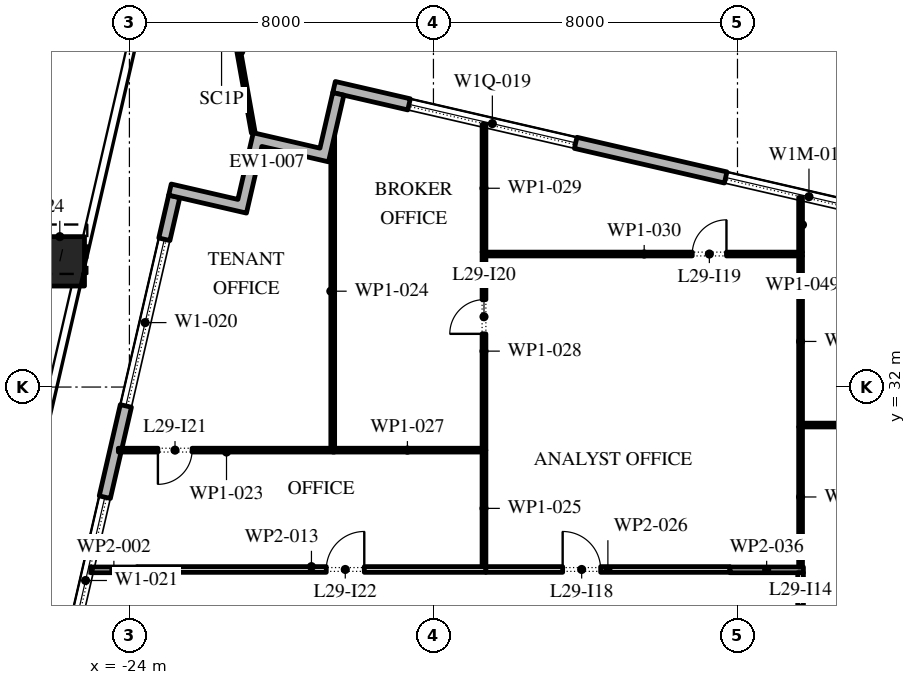
"""IFC4 building model, lengths in metres.
Left out: names, types, materials, properties, quantities, classifications, styles, units other than length and angle.
Written with IfcOpenShell. Run it as: python <this file> out.ifc"""

import sys

from ifc_helpers import new_model, si_unit, direction, frame, frame_2d, origin, origin_2d, place, context, subcontext, project, spatial, polyline, rectangle, outline, extrude, element, fill, save


model = new_model("IFC4")
c1 = context("Model", 3, precision=1e-05, world=origin(), true_north=direction((0.0, 1.0)))
c2 = subcontext(c1, "Body", "Model", "MODEL_VIEW")
j1 = project(units=[si_unit("LENGTHUNIT", "METRE"), si_unit("PLANEANGLEUNIT", "RADIAN")], contexts=[c1])
p1 = place(None, origin())
s1 = spatial("IfcSite", under=j1, at=p1, CompositionType="ELEMENT")
p2 = place(p1, origin())
s2 = spatial("IfcBuilding", under=s1, at=p2, CompositionType="ELEMENT")
p3 = place(p2, frame((0.0, 0.0, 135.0)))
s3 = spatial("IfcBuildingStorey", under=s2, at=p3, CompositionType="ELEMENT", Elevation=135.0)
p4 = place(p3, frame((-25.832, 35.308, 0.0), z_axis=(0.017502025619, 0.075687567741, 0.996977969259), x_axis=(-0.974290512438, 0.225295355862, 0.0)))
e1 = element("IfcColumn", 1, at=p4, inside=s3, PredefinedType="COLUMN", context=c2, shape_type="SweptSolid", body=[
    extrude(rectangle(XDim=1.3, YDim=1.3, at=origin_2d()), origin(), (0.0, 0.0, 1.0), 4.213),
])
p5 = place(p3, frame((31.078, 28.421, 0.0), z_axis=(0.0, 0.0, 1.0), x_axis=(-0.974370456532, 0.224949357493, 0.0)))
e2 = element("IfcWall", 2, at=p5, inside=s3, PredefinedType="STANDARD", context=c2, shape_type="SweptSolid", body=[
    extrude(rectangle(XDim=51.0, YDim=0.3, at=frame_2d((25.5, 0.0))), origin(), (0.0, 0.0, 1.0), 4.0),
])
p6 = place(p5, frame((1.875, 0.0, 0.45)))
e3 = element("IfcOpeningElement", 3, at=p6, cuts=e2, PredefinedType="OPENING", context=c2, shape_type="SweptSolid", body=[
    extrude(rectangle(XDim=4.5, YDim=2.95, at=frame_2d((2.25, 1.475))), frame((0.0, 0.16, 0.0), z_axis=(0.0, -1.0, 0.0), x_axis=(1.0, 0.0, 0.0)), (0.0, 0.0, 1.0), 0.32),
])
p7 = place(p5, frame((10.275, 0.0, 0.45)))
e4 = element("IfcOpeningElement", 4, at=p7, cuts=e2, PredefinedType="OPENING", context=c2, shape_type="SweptSolid", body=[
    extrude(rectangle(XDim=4.5, YDim=2.825, at=frame_2d((2.25, 1.413))), frame((0.0, 0.16, 0.0), z_axis=(0.0, -1.0, 0.0), x_axis=(1.0, 0.0, 0.0)), (0.0, 0.0, 1.0), 0.32),
])
p8 = place(p5, frame((18.825, 0.0, 0.45)))
e5 = element("IfcOpeningElement", 5, at=p8, cuts=e2, PredefinedType="OPENING", context=c2, shape_type="SweptSolid", body=[
    extrude(rectangle(XDim=4.5, YDim=2.75, at=frame_2d((2.25, 1.375))), frame((0.0, 0.16, 0.0), z_axis=(0.0, -1.0, 0.0), x_axis=(1.0, 0.0, 0.0)), (0.0, 0.0, 1.0), 0.32),
])
p9 = place(p5, frame((27.075, 0.0, 0.0)))
e6 = element("IfcOpeningElement", 6, at=p9, cuts=e2, PredefinedType="OPENING", context=c2, shape_type="SweptSolid", body=[
    extrude(rectangle(XDim=2.4, YDim=3.125, at=frame_2d((1.2, 1.562))), frame((0.0, 0.16, 0.0), z_axis=(0.0, -1.0, 0.0), x_axis=(1.0, 0.0, 0.0)), (0.0, 0.0, 1.0), 0.32),
])
p10 = place(p5, frame((35.925, 0.0, 0.45)))
e7 = element("IfcOpeningElement", 7, at=p10, cuts=e2, PredefinedType="OPENING", context=c2, shape_type="SweptSolid", body=[
    extrude(rectangle(XDim=4.5, YDim=2.575, at=frame_2d((2.25, 1.288))), frame((0.0, 0.16, 0.0), z_axis=(0.0, -1.0, 0.0), x_axis=(1.0, 0.0, 0.0)), (0.0, 0.0, 1.0), 0.32),
])
p11 = place(p5, frame((44.475, 0.0, 0.45)))
e8 = element("IfcOpeningElement", 8, at=p11, cuts=e2, PredefinedType="OPENING", context=c2, shape_type="SweptSolid", body=[
    extrude(rectangle(XDim=4.5, YDim=2.45, at=frame_2d((2.25, 1.225))), frame((0.0, 0.16, 0.0), z_axis=(0.0, -1.0, 0.0), x_axis=(1.0, 0.0, 0.0)), (0.0, 0.0, 1.0), 0.32),
])
p12 = place(p3, frame((-22.82, 37.016, 0.0), z_axis=(0.0, 0.0, 1.0), x_axis=(-0.224953880882, -0.974369412223, 0.0)))
e9 = element("IfcWall", 9, at=p12, inside=s3, PredefinedType="STANDARD", context=c2, shape_type="SweptSolid", body=[
    extrude(rectangle(XDim=49.5, YDim=0.3, at=frame_2d((24.75, 0.0))), origin(), (0.0, 0.0, 1.0), 4.0),
])
p13 = place(p12, frame((1.157, 0.0, 0.45)))
e10 = element("IfcOpeningElement", 10, at=p13, cuts=e9, PredefinedType="OPENING", context=c2, shape_type="SweptSolid", body=[
    extrude(rectangle(XDim=4.5, YDim=3.05, at=frame_2d((2.25, 1.525))), frame((0.0, 0.16, 0.0), z_axis=(0.0, -1.0, 0.0), x_axis=(1.0, 0.0, 0.0)), (0.0, 0.0, 1.0), 0.32),
])
p14 = place(p12, frame((8.121, 0.0, 0.45)))
e11 = element("IfcOpeningElement", 11, at=p14, cuts=e9, PredefinedType="OPENING", context=c2, shape_type="SweptSolid", body=[
    extrude(rectangle(XDim=4.5, YDim=3.05, at=frame_2d((2.25, 1.525))), frame((0.0, 0.16, 0.0), z_axis=(0.0, -1.0, 0.0), x_axis=(1.0, 0.0, 0.0)), (0.0, 0.0, 1.0), 0.32),
])
p15 = place(p12, frame((15.236, 0.0, 0.45)))
e12 = element("IfcOpeningElement", 12, at=p15, cuts=e9, PredefinedType="OPENING", context=c2, shape_type="SweptSolid", body=[
    extrude(rectangle(XDim=4.5, YDim=3.05, at=frame_2d((2.25, 1.525))), frame((0.0, 0.16, 0.0), z_axis=(0.0, -1.0, 0.0), x_axis=(1.0, 0.0, 0.0)), (0.0, 0.0, 1.0), 0.32),
])
p16 = place(p12, frame((23.4, 0.0, 0.0)))
e13 = element("IfcOpeningElement", 13, at=p16, cuts=e9, PredefinedType="OPENING", context=c2, shape_type="SweptSolid", body=[
    extrude(rectangle(XDim=2.4, YDim=3.5, at=frame_2d((1.2, 1.75))), frame((0.0, 0.16, 0.0), z_axis=(0.0, -1.0, 0.0), x_axis=(1.0, 0.0, 0.0)), (0.0, 0.0, 1.0), 0.32),
])
p17 = place(p12, frame((29.464, 0.0, 0.45)))
e14 = element("IfcOpeningElement", 14, at=p17, cuts=e9, PredefinedType="OPENING", context=c2, shape_type="SweptSolid", body=[
    extrude(rectangle(XDim=4.5, YDim=2.875, at=frame_2d((2.25, 1.438))), frame((0.0, 0.16, 0.0), z_axis=(0.0, -1.0, 0.0), x_axis=(1.0, 0.0, 0.0)), (0.0, 0.0, 1.0), 0.32),
])
p18 = place(p12, frame((36.579, 0.0, 0.45)))
e15 = element("IfcOpeningElement", 15, at=p18, cuts=e9, PredefinedType="OPENING", context=c2, shape_type="SweptSolid", body=[
    extrude(rectangle(XDim=4.5, YDim=2.675, at=frame_2d((2.25, 1.337))), frame((0.0, 0.16, 0.0), z_axis=(0.0, -1.0, 0.0), x_axis=(1.0, 0.0, 0.0)), (0.0, 0.0, 1.0), 0.32),
])
p19 = place(p12, frame((43.693, 0.0, 0.45)))
e16 = element("IfcOpeningElement", 16, at=p19, cuts=e9, PredefinedType="OPENING", context=c2, shape_type="SweptSolid", body=[
    extrude(rectangle(XDim=4.5, YDim=3.05, at=frame_2d((2.25, 1.525))), frame((0.0, 0.16, 0.0), z_axis=(0.0, -1.0, 0.0), x_axis=(1.0, 0.0, 0.0)), (0.0, 0.0, 1.0), 0.32),
])
p20 = place(p3, origin())
e17 = element("IfcWall", 17, at=p20, inside=s3, PredefinedType="STANDARD", context=c2, shape_type="SweptSolid", body=[
    extrude(outline(polyline([(-22.967, 37.049), (-22.899, 37.342), (-21.145, 36.937), (-20.74, 38.691), (-18.986, 38.286), (-18.649, 39.747), (-18.357, 39.68), (-18.762, 37.926), (-20.515, 38.331), (-20.92, 36.577), (-22.967, 37.049)])), origin(), (0.0, 0.0, 1.0), 4.0),
])
p21 = place(p3, frame((-20.74, 38.691, -0.05), z_axis=(0.0, 0.0, 1.0), x_axis=(-0.175911858108, 0.984405921446, 0.0)))
e18 = element("IfcWall", 18, at=p21, inside=s3, PredefinedType="STANDARD", context=c2, shape_type="SweptSolid", body=[
    extrude(rectangle(XDim=4.322, YDim=0.1, at=frame_2d((2.161, 0.0))), origin(), (0.0, 0.0, 1.0), 4.05),
])
p22 = place(p3, frame((-25.017, 27.19, 0.0), z_axis=(0.0, 0.0, 1.0), x_axis=(1.0, 0.0, 0.0)))
e19 = element("IfcWall", 19, at=p22, inside=s3, PredefinedType="PARTITIONING", context=c2, shape_type="SweptSolid", body=[
    extrude(rectangle(XDim=1.217, YDim=0.15, at=frame_2d((0.608, 0.0))), origin(), (0.0, 0.0, 1.0), 4.0),
])
p23 = place(p3, frame((-23.8, 27.2, 0.0), z_axis=(0.0, 0.0, 1.0), x_axis=(1.0, 0.0, 0.0)))
e20 = element("IfcWall", 20, at=p23, inside=s3, PredefinedType="PARTITIONING", context=c2, shape_type="SweptSolid", body=[
    extrude(rectangle(XDim=9.18, YDim=0.15, at=frame_2d((4.59, 0.0))), origin(), (0.0, 0.0, 1.0), 4.0),
])
p24 = place(p23, frame((4.98, 0.0, 0.0)))
e21 = element("IfcOpeningElement", 21, at=p24, cuts=e20, PredefinedType="OPENING", context=c2, shape_type="SweptSolid", body=[
    extrude(rectangle(XDim=1.0, YDim=2.1, at=frame_2d((0.5, 1.05))), frame((0.0, 0.085, 0.0), z_axis=(0.0, -1.0, 0.0), x_axis=(1.0, 0.0, 0.0)), (0.0, 0.0, 1.0), 0.17),
])
p25 = place(p3, frame((-18.6, 30.34, 0.0), z_axis=(0.0, 0.0, 1.0), x_axis=(-1.0, 0.0, 0.0)))
e22 = element("IfcWall", 22, at=p25, inside=s3, PredefinedType="PARTITIONING", context=c2, shape_type="SweptSolid", body=[
    extrude(rectangle(XDim=5.69, YDim=0.1, at=frame_2d((2.845, 0.0))), origin(), (0.0, 0.0, 1.0), 4.0),
])
p26 = place(p25, frame((3.75, 0.0, 0.0)))
e23 = element("IfcOpeningElement", 23, at=p26, cuts=e22, PredefinedType="OPENING", context=c2, shape_type="SweptSolid", body=[
    extrude(rectangle(XDim=0.9, YDim=2.1, at=frame_2d((0.45, 1.05))), frame((0.0, 0.06, 0.0), z_axis=(0.0, -1.0, 0.0), x_axis=(1.0, 0.0, 0.0)), (0.0, 0.0, 1.0), 0.12),
])
p27 = place(p3, frame((-18.65, 30.39, 0.0), z_axis=(0.0, 0.0, 1.0), x_axis=(0.0, 1.0, 0.0)))
e24 = element("IfcWall", 24, at=p27, inside=s3, PredefinedType="PARTITIONING", context=c2, shape_type="SweptSolid", body=[
    extrude(rectangle(XDim=8.264, YDim=0.1, at=frame_2d((4.132, 0.0))), origin(), (0.0, 0.0, 1.0), 4.0),
])
p28 = place(p3, frame((-14.67, 27.275, 0.0), z_axis=(0.0, 0.0, 1.0), x_axis=(0.0, 1.0, 0.0)))
e25 = element("IfcWall", 25, at=p28, inside=s3, PredefinedType="PARTITIONING", context=c2, shape_type="SweptSolid", body=[
    extrude(rectangle(XDim=3.065, YDim=0.1, at=frame_2d((1.533, 0.0))), origin(), (0.0, 0.0, 1.0), 4.0),
])
p29 = place(p3, frame((-14.62, 27.2, 0.0), z_axis=(0.0, 0.0, 1.0), x_axis=(1.0, 0.0, 0.0)))
e26 = element("IfcWall", 26, at=p29, inside=s3, PredefinedType="PARTITIONING", context=c2, shape_type="SweptSolid", body=[
    extrude(rectangle(XDim=6.42, YDim=0.15, at=frame_2d((3.21, 0.0))), origin(), (0.0, 0.0, 1.0), 4.0),
])
p30 = place(p29, frame((2.02, 0.0, 0.0)))
e27 = element("IfcOpeningElement", 27, at=p30, cuts=e26, PredefinedType="OPENING", context=c2, shape_type="SweptSolid", body=[
    extrude(rectangle(XDim=1.0, YDim=2.1, at=frame_2d((0.5, 1.05))), frame((0.0, 0.085, 0.0), z_axis=(0.0, -1.0, 0.0), x_axis=(1.0, 0.0, 0.0)), (0.0, 0.0, 1.0), 0.17),
])
p31 = place(p3, frame((-14.72, 30.34, 0.0), z_axis=(0.0, 0.0, 1.0), x_axis=(-1.0, 0.0, 0.0)))
e28 = element("IfcWall", 28, at=p31, inside=s3, PredefinedType="PARTITIONING", context=c2, shape_type="SweptSolid", body=[
    extrude(rectangle(XDim=3.93, YDim=0.1, at=frame_2d((1.965, 0.0))), origin(), (0.0, 0.0, 1.0), 4.0),
])
p32 = place(p3, frame((-14.67, 30.34, 0.0), z_axis=(0.0, 0.0, 1.0), x_axis=(0.0, 1.0, 0.0)))
e29 = element("IfcWall", 29, at=p32, inside=s3, PredefinedType="PARTITIONING", context=c2, shape_type="SweptSolid", body=[
    extrude(rectangle(XDim=5.21, YDim=0.1, at=frame_2d((2.605, 0.0))), origin(), (0.0, 0.0, 1.0), 4.0),
])
p33 = place(p32, frame((3.06, 0.0, 0.0)))
e30 = element("IfcOpeningElement", 30, at=p33, cuts=e29, PredefinedType="OPENING", context=c2, shape_type="SweptSolid", body=[
    extrude(rectangle(XDim=0.9, YDim=2.1, at=frame_2d((0.45, 1.05))), frame((0.0, 0.06, 0.0), z_axis=(0.0, -1.0, 0.0), x_axis=(1.0, 0.0, 0.0)), (0.0, 0.0, 1.0), 0.12),
])
p34 = place(p3, frame((-14.67, 35.55, 0.0), z_axis=(0.0, 0.0, 1.0), x_axis=(0.0, 1.0, 0.0)))
e31 = element("IfcWall", 31, at=p34, inside=s3, PredefinedType="PARTITIONING", context=c2, shape_type="SweptSolid", body=[
    extrude(rectangle(XDim=3.361, YDim=0.1, at=frame_2d((1.68, 0.0))), origin(), (0.0, 0.0, 1.0), 4.0),
])
p35 = place(p3, frame((-14.62, 35.5, 0.0), z_axis=(0.0, 0.0, 1.0), x_axis=(1.0, 0.0, 0.0)))
e32 = element("IfcWall", 32, at=p35, inside=s3, PredefinedType="PARTITIONING", context=c2, shape_type="SweptSolid", body=[
    extrude(rectangle(XDim=8.33, YDim=0.1, at=frame_2d((4.165, 0.0))), origin(), (0.0, 0.0, 1.0), 4.0),
])
p36 = place(p35, frame((5.43, 0.0, 0.0)))
e33 = element("IfcOpeningElement", 33, at=p36, cuts=e32, PredefinedType="OPENING", context=c2, shape_type="SweptSolid", body=[
    extrude(rectangle(XDim=0.9, YDim=2.1, at=frame_2d((0.45, 1.05))), frame((0.0, 0.06, 0.0), z_axis=(0.0, -1.0, 0.0), x_axis=(1.0, 0.0, 0.0)), (0.0, 0.0, 1.0), 0.12),
])
p37 = place(p3, frame((-8.2, 27.19, 0.0), z_axis=(0.0, 0.0, 1.0), x_axis=(1.0, 0.0, 0.0)))
e34 = element("IfcWall", 34, at=p37, inside=s3, PredefinedType="PARTITIONING", context=c2, shape_type="SweptSolid", body=[
    extrude(rectangle(XDim=1.935, YDim=0.15, at=frame_2d((0.968, 0.0))), origin(), (0.0, 0.0, 1.0), 4.0),
])
p38 = place(p3, frame((-6.34, 27.115, 0.0), z_axis=(0.0, 0.0, 1.0), x_axis=(0.0, -1.0, 0.0)))
e35 = element("IfcWall", 35, at=p38, inside=s3, PredefinedType="PARTITIONING", context=c2, shape_type="SweptSolid", body=[
    extrude(rectangle(XDim=3.655, YDim=0.15, at=frame_2d((1.828, 0.0))), origin(), (0.0, 0.0, 1.0), 4.0),
])
p39 = place(p38, frame((1.055, 0.0, 0.0)))
e36 = element("IfcOpeningElement", 36, at=p39, cuts=e35, PredefinedType="OPENING", context=c2, shape_type="SweptSolid", body=[
    extrude(rectangle(XDim=1.0, YDim=2.1, at=frame_2d((0.5, 1.05))), frame((0.0, 0.085, 0.0), z_axis=(0.0, -1.0, 0.0), x_axis=(1.0, 0.0, 0.0)), (0.0, 0.0, 1.0), 0.17),
])
p40 = place(p3, frame((-6.34, 27.265, 0.0), z_axis=(0.0, 0.0, 1.0), x_axis=(0.0, 1.0, 0.0)))
e37 = element("IfcWall", 37, at=p40, inside=s3, PredefinedType="PARTITIONING", context=c2, shape_type="SweptSolid", body=[
    extrude(rectangle(XDim=3.685, YDim=0.1, at=frame_2d((1.843, 0.0))), origin(), (0.0, 0.0, 1.0), 4.0),
])
p41 = place(p3, frame((-6.34, 30.95, 0.0), z_axis=(0.0, 0.0, 1.0), x_axis=(0.0, 1.0, 0.0)))
e38 = element("IfcWall", 38, at=p41, inside=s3, PredefinedType="PARTITIONING", context=c2, shape_type="SweptSolid", body=[
    extrude(rectangle(XDim=4.5, YDim=0.1, at=frame_2d((2.25, 0.0))), origin(), (0.0, 0.0, 1.0), 4.0),
])
p42 = place(p3, frame((-6.34, 35.55, 0.0), z_axis=(0.0, 0.0, 1.0), x_axis=(0.0, 1.0, 0.0)))
e39 = element("IfcWall", 39, at=p42, inside=s3, PredefinedType="PARTITIONING", context=c2, shape_type="SweptSolid", body=[
    extrude(rectangle(XDim=1.438, YDim=0.1, at=frame_2d((0.719, 0.0))), origin(), (0.0, 0.0, 1.0), 4.0),
])
p43 = place(p3, frame((2.04, 31.0, 0.0), z_axis=(0.0, 0.0, 1.0), x_axis=(-1.0, 0.0, 0.0)))
e40 = element("IfcWall", 40, at=p43, inside=s3, PredefinedType="PARTITIONING", context=c2, shape_type="SweptSolid", body=[
    extrude(rectangle(XDim=8.33, YDim=0.1, at=frame_2d((4.165, 0.0))), origin(), (0.0, 0.0, 1.0), 4.0),
])
p44 = place(p43, frame((2.0, 0.0, 0.0)))
e41 = element("IfcOpeningElement", 41, at=p44, cuts=e40, PredefinedType="OPENING", context=c2, shape_type="SweptSolid", body=[
    extrude(rectangle(XDim=0.9, YDim=2.1, at=frame_2d((0.45, 1.05))), frame((0.0, 0.06, 0.0), z_axis=(0.0, -1.0, 0.0), x_axis=(1.0, 0.0, 0.0)), (0.0, 0.0, 1.0), 0.12),
])
p45 = place(p10, origin())
e42 = element("IfcWindow", 42, at=p45, inside=s3, PartitioningType="DOUBLE_PANEL_VERTICAL", PredefinedType="WINDOW", context=c2, shape_type="SweptSolid", body=[
    extrude(rectangle(XDim=4.5, YDim=2.575, at=frame_2d((2.25, 1.288))), frame((0.0, 0.03, 0.0), z_axis=(0.0, -1.0, 0.0), x_axis=(1.0, 0.0, 0.0)), (0.0, 0.0, 1.0), 0.06),
])
fill(e7, e42)
p46 = place(p11, origin())
e43 = element("IfcWindow", 43, at=p46, inside=s3, PartitioningType="DOUBLE_PANEL_VERTICAL", PredefinedType="WINDOW", context=c2, shape_type="SweptSolid", body=[
    extrude(rectangle(XDim=4.5, YDim=2.45, at=frame_2d((2.25, 1.225))), frame((0.0, 0.03, 0.0), z_axis=(0.0, -1.0, 0.0), x_axis=(1.0, 0.0, 0.0)), (0.0, 0.0, 1.0), 0.06),
])
fill(e8, e43)
p47 = place(p13, origin())
e44 = element("IfcWindow", 44, at=p47, inside=s3, PartitioningType="DOUBLE_PANEL_VERTICAL", PredefinedType="WINDOW", context=c2, shape_type="SweptSolid", body=[
    extrude(rectangle(XDim=4.5, YDim=3.05, at=frame_2d((2.25, 1.525))), frame((0.0, 0.03, 0.0), z_axis=(0.0, -1.0, 0.0), x_axis=(1.0, 0.0, 0.0)), (0.0, 0.0, 1.0), 0.06),
])
fill(e10, e44)
p48 = place(p14, origin())
e45 = element("IfcWindow", 45, at=p48, inside=s3, PartitioningType="DOUBLE_PANEL_VERTICAL", PredefinedType="WINDOW", context=c2, shape_type="SweptSolid", body=[
    extrude(rectangle(XDim=4.5, YDim=3.05, at=frame_2d((2.25, 1.525))), frame((0.0, 0.03, 0.0), z_axis=(0.0, -1.0, 0.0), x_axis=(1.0, 0.0, 0.0)), (0.0, 0.0, 1.0), 0.06),
])
fill(e11, e45)
p49 = place(p30, origin())
e46 = element("IfcDoor", 46, at=p49, inside=s3, OperationType="SINGLE_SWING_RIGHT", PredefinedType="DOOR", context=c2, shape_type="SweptSolid", body=[
    extrude(rectangle(XDim=1.0, YDim=2.1, at=frame_2d((0.5, 1.05))), frame((0.0, 0.025, 0.0), z_axis=(0.0, -1.0, 0.0), x_axis=(1.0, 0.0, 0.0)), (0.0, 0.0, 1.0), 0.05),
])
fill(e27, e46)
p50 = place(p36, origin())
e47 = element("IfcDoor", 47, at=p50, inside=s3, OperationType="SINGLE_SWING_LEFT", PredefinedType="DOOR", context=c2, shape_type="SweptSolid", body=[
    extrude(rectangle(XDim=0.9, YDim=2.1, at=frame_2d((0.45, 1.05))), frame((0.0, 0.025, 0.0), z_axis=(0.0, -1.0, 0.0), x_axis=(1.0, 0.0, 0.0)), (0.0, 0.0, 1.0), 0.05),
])
fill(e33, e47)
p51 = place(p33, origin())
e48 = element("IfcDoor", 48, at=p51, inside=s3, OperationType="SINGLE_SWING_RIGHT", PredefinedType="DOOR", context=c2, shape_type="SweptSolid", body=[
    extrude(rectangle(XDim=0.9, YDim=2.1, at=frame_2d((0.45, 1.05))), frame((0.0, 0.025, 0.0), z_axis=(0.0, -1.0, 0.0), x_axis=(1.0, 0.0, 0.0)), (0.0, 0.0, 1.0), 0.05),
])
fill(e30, e48)
p52 = place(p26, origin())
e49 = element("IfcDoor", 49, at=p52, inside=s3, OperationType="SINGLE_SWING_LEFT", PredefinedType="DOOR", context=c2, shape_type="SweptSolid", body=[
    extrude(rectangle(XDim=0.9, YDim=2.1, at=frame_2d((0.45, 1.05))), frame((0.0, 0.025, 0.0), z_axis=(0.0, -1.0, 0.0), x_axis=(1.0, 0.0, 0.0)), (0.0, 0.0, 1.0), 0.05),
])
fill(e23, e49)
p53 = place(p24, origin())
e50 = element("IfcDoor", 50, at=p53, inside=s3, OperationType="SINGLE_SWING_LEFT", PredefinedType="DOOR", context=c2, shape_type="SweptSolid", body=[
    extrude(rectangle(XDim=1.0, YDim=2.1, at=frame_2d((0.5, 1.05))), frame((0.0, 0.025, 0.0), z_axis=(0.0, -1.0, 0.0), x_axis=(1.0, 0.0, 0.0)), (0.0, 0.0, 1.0), 0.05),
])
fill(e21, e50)
save(model, sys.argv[1])
